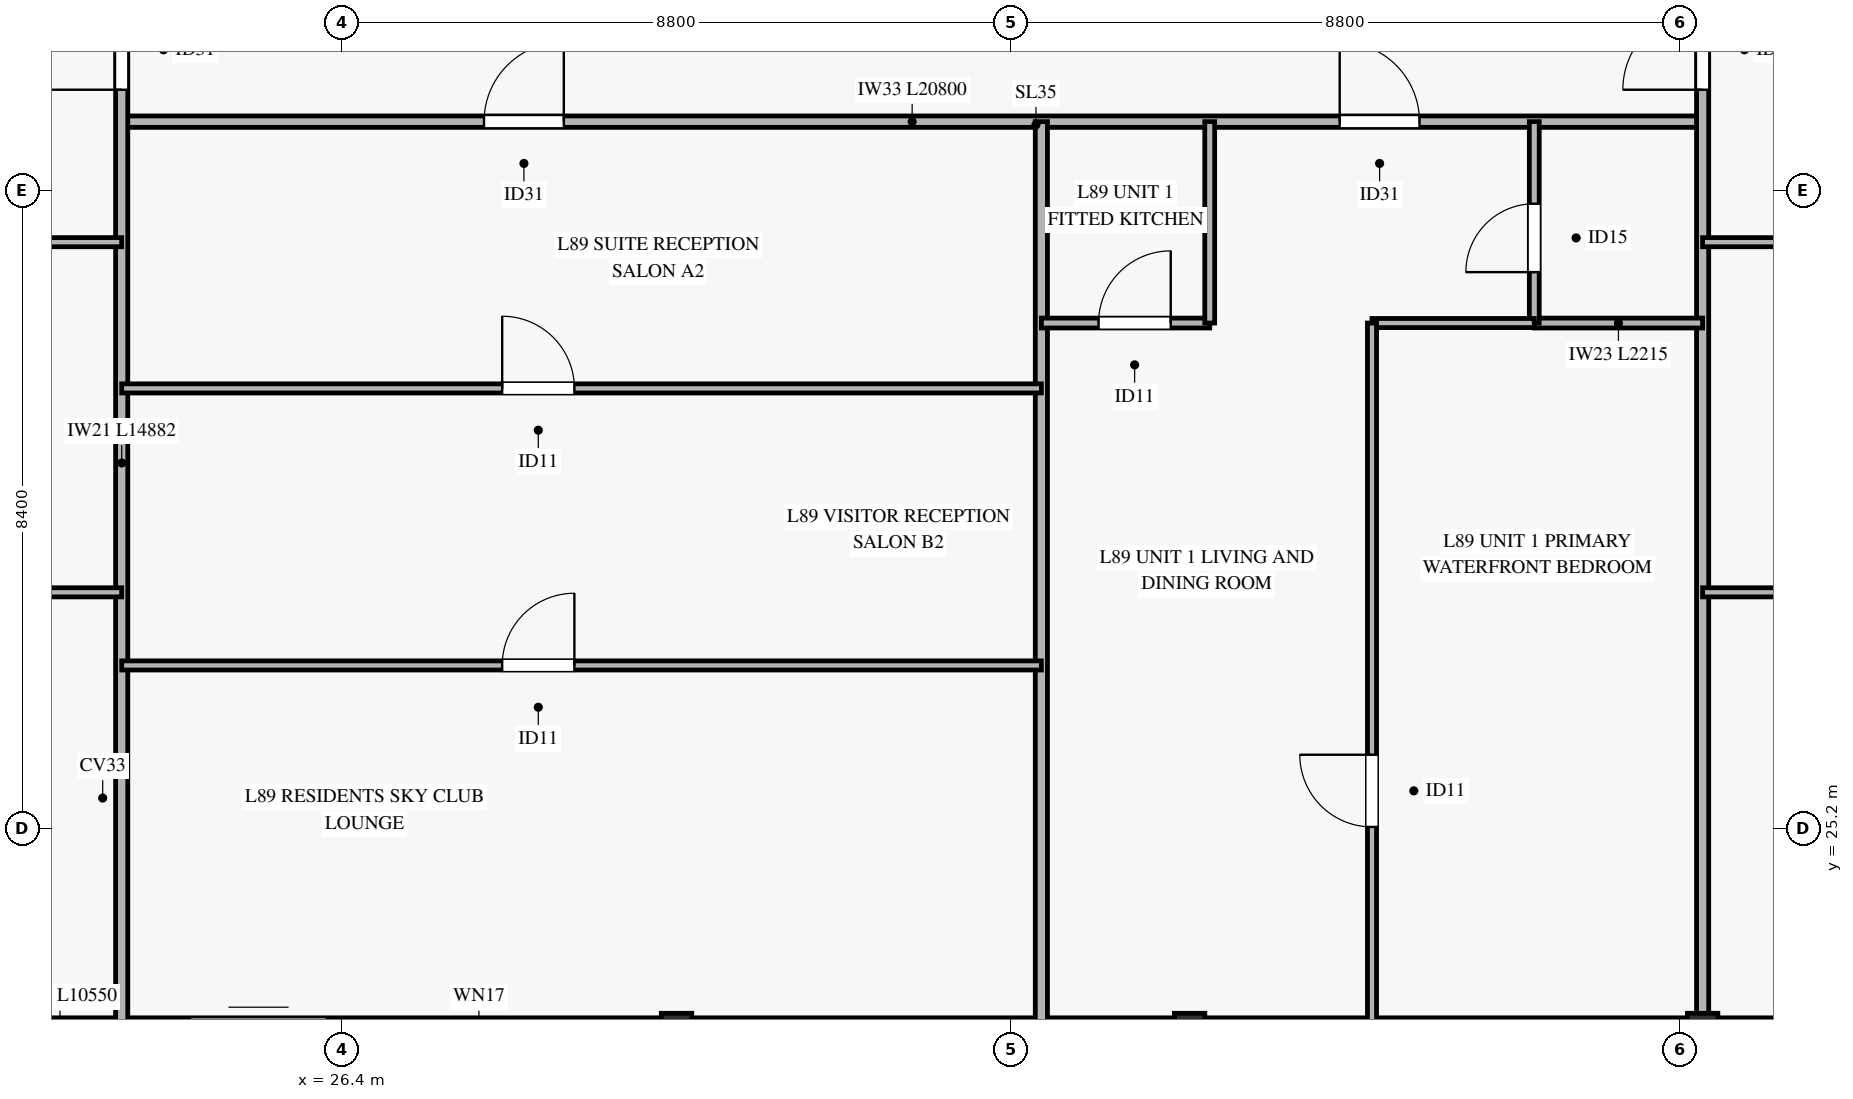
"""IFC4 building model, lengths in metres.
Left out: names, types, materials, properties, quantities, classifications, styles, units other than length and angle.
Written with IfcOpenShell. Run it as: python <this file> out.ifc"""

import sys

from ifc_helpers import new_model, si_unit, direction, frame, frame_2d, origin, origin_2d, place, context, subcontext, project, spatial, rectangle, hollow_rectangle, extrude, source, transform, mapped, element, fill, save


model = new_model("IFC4")
c1 = context("Model", 3, precision=1e-05, world=origin(), true_north=direction((0.0, 1.0)))
c2 = subcontext(c1, "Body", "Model", "MODEL_VIEW")
j1 = project(units=[si_unit("LENGTHUNIT", "METRE"), si_unit("PLANEANGLEUNIT", "RADIAN")], contexts=[c1])
p1 = place(None, origin())
s1 = spatial("IfcSite", under=j1, at=p1, CompositionType="ELEMENT")
p2 = place(p1, origin())
s2 = spatial("IfcBuilding", under=s1, at=p2, CompositionType="ELEMENT")
p3 = place(p2, frame((0.0, 0.0, 342.5)))
s3 = spatial("IfcBuildingStorey", under=s2, at=p3, CompositionType="ELEMENT", Elevation=342.5)
m1 = source(origin(), c2, "Body", "SweptSolid", [
    extrude(hollow_rectangle(XDim=0.4, YDim=0.4, WallThickness=0.02, at=origin_2d()), origin(), (0.0, 0.0, 1.0), 3.319),
])
for number, where, z_axis, x_axis in (
    (1, (30.8, 22.568, 0.0), (0.0, 0.281, 0.96), (-1.0, 0.0, 0.0)),
    (2, (37.55, 22.568, 0.0), (0.0, 0.281, 0.96), (-1.0, 0.0, 0.0)),
    (3, (44.3, 22.568, 0.0), (0.0, 0.281, 0.96), (-1.0, 0.0, 0.0)),
):
    element("IfcColumn", number, at=place(p3, frame(where, z_axis=z_axis, x_axis=x_axis)), inside=s3, PredefinedType="COLUMN", context=c2, shape_type="MappedRepresentation", body=[
        mapped(m1, transform((0.0, 0.0, 0.0), x_axis=(1.0, 0.0, 0.0), y_axis=(0.0, 1.0, 0.0), z_axis=(0.0, 0.0, 1.0), scale=1.0)),
    ])
p4 = place(p3, frame((20.05, 22.568, 0.0), z_axis=(0.0, 0.0, 1.0), x_axis=(1.0, 0.0, 0.0)))
e4 = element("IfcWall", 4, at=p4, inside=s3, PredefinedType="SOLIDWALL", context=c2, shape_type="SweptSolid", body=[
    extrude(rectangle(XDim=10.55, YDim=0.28, at=frame_2d((5.275, 0.0))), origin(), (0.0, 0.0, 1.0), 2.815),
])
p5 = place(p4, frame((4.35, 0.0, 0.0)))
e5 = element("IfcOpeningElement", 5, at=p5, cuts=e4, PredefinedType="OPENING", context=c2, shape_type="SweptSolid", body=[
    extrude(rectangle(XDim=1.8, YDim=2.25, at=frame_2d((0.9, 1.125))), frame((0.0, 0.15, 0.0), z_axis=(0.0, -1.0, 0.0), x_axis=(1.0, 0.0, 0.0)), (0.0, 0.0, 1.0), 0.3),
])
p6 = place(p4, frame((0.65, 0.0, 0.45)))
e6 = element("IfcOpeningElement", 6, at=p6, cuts=e4, PredefinedType="OPENING", context=c2, shape_type="SweptSolid", body=[
    extrude(rectangle(XDim=2.2, YDim=2.1, at=frame_2d((1.1, 1.05))), frame((0.0, 0.15, 0.0), z_axis=(0.0, -1.0, 0.0), x_axis=(1.0, 0.0, 0.0)), (0.0, 0.0, 1.0), 0.3),
])
p7 = place(p4, frame((7.35, 0.0, 0.45)))
e7 = element("IfcOpeningElement", 7, at=p7, cuts=e4, PredefinedType="OPENING", context=c2, shape_type="SweptSolid", body=[
    extrude(rectangle(XDim=1.6, YDim=2.0, at=frame_2d((0.8, 1.0))), frame((0.0, 0.15, 0.0), z_axis=(0.0, -1.0, 0.0), x_axis=(1.0, 0.0, 0.0)), (0.0, 0.0, 1.0), 0.3),
])
for number, where, z_axis, x_axis in (
    (8, (31.0, 22.568, 0.0), (0.0, 0.0, 1.0), (1.0, 0.0, 0.0)),
    (9, (37.75, 22.568, 0.0), (0.0, 0.0, 1.0), (1.0, 0.0, 0.0)),
):
    element("IfcWall", number, at=place(p3, frame(where, z_axis=z_axis, x_axis=x_axis)), inside=s3, PredefinedType="SOLIDWALL", context=c2, shape_type="SweptSolid", body=[
        extrude(rectangle(XDim=6.35, YDim=0.28, at=frame_2d((3.175, 0.0))), origin(), (0.0, 0.0, 1.0), 2.815),
    ])
p8 = place(p3, frame((44.5, 22.568, 0.0), z_axis=(0.0, 0.0, 1.0), x_axis=(1.0, 0.0, 0.0)))
e10 = element("IfcWall", 10, at=p8, inside=s3, PredefinedType="SOLIDWALL", context=c2, shape_type="SweptSolid", body=[
    extrude(rectangle(XDim=5.85, YDim=0.28, at=frame_2d((2.925, 0.0))), origin(), (0.0, 0.0, 1.0), 2.815),
])
p9 = place(p8, frame((2.0, 0.0, 0.0)))
e11 = element("IfcOpeningElement", 11, at=p9, cuts=e10, PredefinedType="OPENING", context=c2, shape_type="SweptSolid", body=[
    extrude(rectangle(XDim=1.8, YDim=2.25, at=frame_2d((0.9, 1.125))), frame((0.0, 0.15, 0.0), z_axis=(0.0, -1.0, 0.0), x_axis=(1.0, 0.0, 0.0)), (0.0, 0.0, 1.0), 0.3),
])
p10 = place(p3, frame((23.5, 34.5, 0.0), z_axis=(0.0, 0.0, 1.0), x_axis=(1.0, 0.0, 0.0)))
e12 = element("IfcWall", 12, at=p10, inside=s3, PredefinedType="PARTITIONING", context=c2, shape_type="SweptSolid", body=[
    extrude(rectangle(XDim=20.8, YDim=0.15, at=frame_2d((10.4, 0.0))), origin(), (0.0, 0.0, 1.0), 2.47),
])
p11 = place(p10, frame((4.767, 0.0, 0.0)))
e13 = element("IfcOpeningElement", 13, at=p11, cuts=e12, PredefinedType="OPENING", context=c2, shape_type="SweptSolid", body=[
    extrude(rectangle(XDim=1.05, YDim=2.15, at=frame_2d((0.525, 1.075))), frame((0.0, 0.085, 0.0), z_axis=(0.0, -1.0, 0.0), x_axis=(1.0, 0.0, 0.0)), (0.0, 0.0, 1.0), 0.17),
])
p12 = place(p10, frame((16.025, 0.0, 0.0)))
e14 = element("IfcOpeningElement", 14, at=p12, cuts=e12, PredefinedType="OPENING", context=c2, shape_type="SweptSolid", body=[
    extrude(rectangle(XDim=1.05, YDim=2.15, at=frame_2d((0.525, 1.075))), frame((0.0, 0.085, 0.0), z_axis=(0.0, -1.0, 0.0), x_axis=(1.0, 0.0, 0.0)), (0.0, 0.0, 1.0), 0.17),
])
p13 = place(p3, frame((23.5, 22.568, 0.0), z_axis=(0.0, 0.0, 1.0), x_axis=(0.0, 1.0, 0.0)))
e15 = element("IfcWall", 15, at=p13, inside=s3, PredefinedType="PARTITIONING", context=c2, shape_type="SweptSolid", body=[
    extrude(rectangle(XDim=14.882, YDim=0.16, at=frame_2d((7.441, 0.0))), origin(), (0.0, 0.0, 1.0), 2.77),
])
p14 = place(p13, frame((12.352, 0.0, 0.0)))
e16 = element("IfcOpeningElement", 16, at=p14, cuts=e15, PredefinedType="OPENING", context=c2, shape_type="SweptSolid", body=[
    extrude(rectangle(XDim=1.05, YDim=2.15, at=frame_2d((0.525, 1.075))), frame((0.0, 0.09, 0.0), z_axis=(0.0, -1.0, 0.0), x_axis=(1.0, 0.0, 0.0)), (0.0, 0.0, 1.0), 0.18),
])
p15 = place(p3, frame((35.6, 22.568, 0.0), z_axis=(0.0, 0.0, 1.0), x_axis=(0.0, 1.0, 0.0)))
e17 = element("IfcWall", 17, at=p15, inside=s3, PredefinedType="PARTITIONING", context=c2, shape_type="SweptSolid", body=[
    extrude(rectangle(XDim=11.932, YDim=0.16, at=frame_2d((5.966, 0.0))), origin(), (0.0, 0.0, 1.0), 2.77),
])
p16 = place(p3, frame((44.3, 22.568, 0.0), z_axis=(0.0, 0.0, 1.0), x_axis=(0.0, 1.0, 0.0)))
e18 = element("IfcWall", 18, at=p16, inside=s3, PredefinedType="PARTITIONING", context=c2, shape_type="SweptSolid", body=[
    extrude(rectangle(XDim=14.882, YDim=0.16, at=frame_2d((7.441, 0.0))), origin(), (0.0, 0.0, 1.0), 2.47),
])
p17 = place(p16, frame((12.352, 0.0, 0.0)))
e19 = element("IfcOpeningElement", 19, at=p17, cuts=e18, PredefinedType="OPENING", context=c2, shape_type="SweptSolid", body=[
    extrude(rectangle(XDim=1.05, YDim=2.15, at=frame_2d((0.525, 1.075))), frame((0.0, 0.09, 0.0), z_axis=(0.0, -1.0, 0.0), x_axis=(1.0, 0.0, 0.0)), (0.0, 0.0, 1.0), 0.18),
])
p18 = place(p3, frame((11.685, 28.307, 0.0), z_axis=(0.0, 0.0, 1.0), x_axis=(1.0, 0.0, 0.0)))
e20 = element("IfcWall", 20, at=p18, inside=s3, PredefinedType="PARTITIONING", context=c2, shape_type="SweptSolid", body=[
    extrude(rectangle(XDim=11.815, YDim=0.12, at=frame_2d((5.907, 0.0))), origin(), (0.0, 0.0, 1.0), 2.47),
])
p19 = place(p18, frame((5.261, 0.0, 0.0)))
e21 = element("IfcOpeningElement", 21, at=p19, cuts=e20, PredefinedType="OPENING", context=c2, shape_type="SweptSolid", body=[
    extrude(rectangle(XDim=0.95, YDim=2.1, at=frame_2d((0.475, 1.05))), frame((0.0, 0.07, 0.0), z_axis=(0.0, -1.0, 0.0), x_axis=(1.0, 0.0, 0.0)), (0.0, 0.0, 1.0), 0.14),
])
p20 = place(p3, frame((11.685, 32.914, 0.0), z_axis=(0.0, 0.0, 1.0), x_axis=(1.0, 0.0, 0.0)))
e22 = element("IfcWall", 22, at=p20, inside=s3, PredefinedType="PARTITIONING", context=c2, shape_type="SweptSolid", body=[
    extrude(rectangle(XDim=11.815, YDim=0.12, at=frame_2d((5.907, 0.0))), origin(), (0.0, 0.0, 1.0), 2.47),
])
p21 = place(p20, frame((5.261, 0.0, 0.0)))
e23 = element("IfcOpeningElement", 23, at=p21, cuts=e22, PredefinedType="OPENING", context=c2, shape_type="SweptSolid", body=[
    extrude(rectangle(XDim=0.95, YDim=2.1, at=frame_2d((0.475, 1.05))), frame((0.0, 0.07, 0.0), z_axis=(0.0, -1.0, 0.0), x_axis=(1.0, 0.0, 0.0)), (0.0, 0.0, 1.0), 0.14),
])
p22 = place(p3, frame((23.5, 27.345, 0.0), z_axis=(0.0, 0.0, 1.0), x_axis=(1.0, 0.0, 0.0)))
e24 = element("IfcWall", 24, at=p22, inside=s3, PredefinedType="PARTITIONING", context=c2, shape_type="SweptSolid", body=[
    extrude(rectangle(XDim=12.1, YDim=0.12, at=frame_2d((6.05, 0.0))), origin(), (0.0, 0.0, 1.0), 2.47),
])
p23 = place(p22, frame((5.006, 0.0, 0.0)))
e25 = element("IfcOpeningElement", 25, at=p23, cuts=e24, PredefinedType="OPENING", context=c2, shape_type="SweptSolid", body=[
    extrude(rectangle(XDim=0.95, YDim=2.1, at=frame_2d((0.475, 1.05))), frame((0.0, 0.07, 0.0), z_axis=(0.0, -1.0, 0.0), x_axis=(1.0, 0.0, 0.0)), (0.0, 0.0, 1.0), 0.14),
])
p24 = place(p3, frame((23.5, 30.99, 0.0), z_axis=(0.0, 0.0, 1.0), x_axis=(1.0, 0.0, 0.0)))
e26 = element("IfcWall", 26, at=p24, inside=s3, PredefinedType="PARTITIONING", context=c2, shape_type="SweptSolid", body=[
    extrude(rectangle(XDim=12.1, YDim=0.12, at=frame_2d((6.05, 0.0))), origin(), (0.0, 0.0, 1.0), 2.47),
])
p25 = place(p24, frame((5.006, 0.0, 0.0)))
e27 = element("IfcOpeningElement", 27, at=p25, cuts=e26, PredefinedType="OPENING", context=c2, shape_type="SweptSolid", body=[
    extrude(rectangle(XDim=0.95, YDim=2.1, at=frame_2d((0.475, 1.05))), frame((0.0, 0.07, 0.0), z_axis=(0.0, -1.0, 0.0), x_axis=(1.0, 0.0, 0.0)), (0.0, 0.0, 1.0), 0.14),
])
p26 = place(p3, frame((35.6, 31.85, 0.0), z_axis=(0.0, 0.0, 1.0), x_axis=(1.0, 0.0, 0.0)))
e28 = element("IfcWall", 28, at=p26, inside=s3, PredefinedType="PARTITIONING", context=c2, shape_type="SweptSolid", body=[
    extrude(rectangle(XDim=2.215, YDim=0.13, at=frame_2d((1.107, 0.0))), origin(), (0.0, 0.0, 1.0), 2.47),
])
p27 = place(p26, frame((0.752, 0.0, 0.0)))
e29 = element("IfcOpeningElement", 29, at=p27, cuts=e28, PredefinedType="OPENING", context=c2, shape_type="SweptSolid", body=[
    extrude(rectangle(XDim=0.95, YDim=2.1, at=frame_2d((0.475, 1.05))), frame((0.0, 0.075, 0.0), z_axis=(0.0, -1.0, 0.0), x_axis=(1.0, 0.0, 0.0)), (0.0, 0.0, 1.0), 0.15),
])
p28 = place(p3, frame((37.815, 31.85, 0.0), z_axis=(0.0, 0.0, 1.0), x_axis=(0.0, 1.0, 0.0)))
e30 = element("IfcWall", 30, at=p28, inside=s3, PredefinedType="PARTITIONING", context=c2, shape_type="SweptSolid", body=[
    extrude(rectangle(XDim=2.65, YDim=0.13, at=frame_2d((1.325, 0.0))), origin(), (0.0, 0.0, 1.0), 2.77),
])
p29 = place(p3, frame((42.085, 31.85, 0.0), z_axis=(0.0, 0.0, 1.0), x_axis=(1.0, 0.0, 0.0)))
e31 = element("IfcWall", 31, at=p29, inside=s3, PredefinedType="PARTITIONING", context=c2, shape_type="SweptSolid", body=[
    extrude(rectangle(XDim=2.215, YDim=0.13, at=frame_2d((1.107, 0.0))), origin(), (0.0, 0.0, 1.0), 2.47),
])
p30 = place(p3, frame((42.085, 31.85, 0.0), z_axis=(0.0, 0.0, 1.0), x_axis=(0.0, 1.0, 0.0)))
e32 = element("IfcWall", 32, at=p30, inside=s3, PredefinedType="PARTITIONING", context=c2, shape_type="SweptSolid", body=[
    extrude(rectangle(XDim=2.65, YDim=0.13, at=frame_2d((1.325, 0.0))), origin(), (0.0, 0.0, 1.0), 2.77),
])
p31 = place(p30, frame((0.67, 0.0, 0.0)))
e33 = element("IfcOpeningElement", 33, at=p31, cuts=e32, PredefinedType="OPENING", context=c2, shape_type="SweptSolid", body=[
    extrude(rectangle(XDim=0.9, YDim=2.1, at=frame_2d((0.45, 1.05))), frame((0.0, 0.075, 0.0), z_axis=(0.0, -1.0, 0.0), x_axis=(1.0, 0.0, 0.0)), (0.0, 0.0, 1.0), 0.15),
])
p32 = place(p3, frame((39.95, 31.85, 0.0), z_axis=(0.0, 0.0, 1.0), x_axis=(1.0, 0.0, 0.0)))
e34 = element("IfcWall", 34, at=p32, inside=s3, PredefinedType="PARTITIONING", context=c2, shape_type="SweptSolid", body=[
    extrude(rectangle(XDim=2.135, YDim=0.12, at=frame_2d((1.067, 0.0))), origin(), (0.0, 0.0, 1.0), 3.185),
])
p33 = place(p3, frame((39.95, 22.568, 0.0), z_axis=(0.0, 0.0, 1.0), x_axis=(0.0, 1.0, 0.0)))
e35 = element("IfcWall", 35, at=p33, inside=s3, PredefinedType="PARTITIONING", context=c2, shape_type="SweptSolid", body=[
    extrude(rectangle(XDim=9.282, YDim=0.12, at=frame_2d((4.641, 0.0))), origin(), (0.0, 0.0, 1.0), 2.77),
])
p34 = place(p33, frame((2.652, 0.0, 0.0)))
e36 = element("IfcOpeningElement", 36, at=p34, cuts=e35, PredefinedType="OPENING", context=c2, shape_type="SweptSolid", body=[
    extrude(rectangle(XDim=0.95, YDim=2.1, at=frame_2d((0.475, 1.05))), frame((0.0, 0.07, 0.0), z_axis=(0.0, -1.0, 0.0), x_axis=(1.0, 0.0, 0.0)), (0.0, 0.0, 1.0), 0.14),
])
p35 = place(p3, frame((44.3, 28.307, 0.0), z_axis=(0.0, 0.0, 1.0), x_axis=(1.0, 0.0, 0.0)))
e37 = element("IfcWall", 37, at=p35, inside=s3, PredefinedType="PARTITIONING", context=c2, shape_type="SweptSolid", body=[
    extrude(rectangle(XDim=14.415, YDim=0.12, at=frame_2d((7.208, 0.0))), origin(), (0.0, 0.0, 1.0), 2.47),
])
p36 = place(p35, frame((5.686, 0.0, 0.0)))
e38 = element("IfcOpeningElement", 38, at=p36, cuts=e37, PredefinedType="OPENING", context=c2, shape_type="SweptSolid", body=[
    extrude(rectangle(XDim=0.95, YDim=2.1, at=frame_2d((0.475, 1.05))), frame((0.0, 0.07, 0.0), z_axis=(0.0, -1.0, 0.0), x_axis=(1.0, 0.0, 0.0)), (0.0, 0.0, 1.0), 0.14),
])
p37 = place(p3, frame((44.3, 32.914, 0.0), z_axis=(0.0, 0.0, 1.0), x_axis=(1.0, 0.0, 0.0)))
e39 = element("IfcWall", 39, at=p37, inside=s3, PredefinedType="PARTITIONING", context=c2, shape_type="SweptSolid", body=[
    extrude(rectangle(XDim=14.415, YDim=0.12, at=frame_2d((7.208, 0.0))), origin(), (0.0, 0.0, 1.0), 2.47),
])
p38 = place(p37, frame((5.686, 0.0, 0.0)))
e40 = element("IfcOpeningElement", 40, at=p38, cuts=e39, PredefinedType="OPENING", context=c2, shape_type="SweptSolid", body=[
    extrude(rectangle(XDim=0.95, YDim=2.1, at=frame_2d((0.475, 1.05))), frame((0.0, 0.07, 0.0), z_axis=(0.0, -1.0, 0.0), x_axis=(1.0, 0.0, 0.0)), (0.0, 0.0, 1.0), 0.14),
])
m2 = source(origin(), c2, "Body", "SweptSolid", [
    extrude(rectangle(XDim=1.05, YDim=2.15, at=frame_2d((0.525, 1.075))), frame((0.0, 0.025, 0.0), z_axis=(0.0, -1.0, 0.0), x_axis=(1.0, 0.0, 0.0)), (0.0, 0.0, 1.0), 0.05),
])
p39 = place(p14, origin())
e41 = element("IfcDoor", 41, at=p39, inside=s3, OperationType="SINGLE_SWING_LEFT", PredefinedType="DOOR", context=c2, shape_type="MappedRepresentation", body=[
    mapped(m2, transform((0.0, 0.0, 0.0), x_axis=(1.0, 0.0, 0.0), y_axis=(0.0, 1.0, 0.0), z_axis=(0.0, 0.0, 1.0), scale=1.0)),
])
fill(e16, e41)
p40 = place(p11, origin())
e42 = element("IfcDoor", 42, at=p40, inside=s3, OperationType="SINGLE_SWING_RIGHT", PredefinedType="DOOR", context=c2, shape_type="MappedRepresentation", body=[
    mapped(m2, transform((0.0, 0.0, 0.0), x_axis=(1.0, 0.0, 0.0), y_axis=(0.0, 1.0, 0.0), z_axis=(0.0, 0.0, 1.0), scale=1.0)),
])
fill(e13, e42)
m3 = source(origin(), c2, "Body", "SweptSolid", [
    extrude(rectangle(XDim=0.95, YDim=2.1, at=frame_2d((0.475, 1.05))), frame((0.0, 0.025, 0.0), z_axis=(0.0, -1.0, 0.0), x_axis=(1.0, 0.0, 0.0)), (0.0, 0.0, 1.0), 0.05),
])
p41 = place(p25, origin())
e43 = element("IfcDoor", 43, at=p41, inside=s3, OperationType="SINGLE_SWING_LEFT", PredefinedType="DOOR", context=c2, shape_type="MappedRepresentation", body=[
    mapped(m3, transform((0.0, 0.0, 0.0), x_axis=(1.0, 0.0, 0.0), y_axis=(0.0, 1.0, 0.0), z_axis=(0.0, 0.0, 1.0), scale=1.0)),
])
fill(e27, e43)
p42 = place(p23, origin())
e44 = element("IfcDoor", 44, at=p42, inside=s3, OperationType="SINGLE_SWING_RIGHT", PredefinedType="DOOR", context=c2, shape_type="MappedRepresentation", body=[
    mapped(m3, transform((0.0, 0.0, 0.0), x_axis=(1.0, 0.0, 0.0), y_axis=(0.0, 1.0, 0.0), z_axis=(0.0, 0.0, 1.0), scale=1.0)),
])
fill(e25, e44)
p43 = place(p12, origin())
e45 = element("IfcDoor", 45, at=p43, inside=s3, OperationType="SINGLE_SWING_LEFT", PredefinedType="DOOR", context=c2, shape_type="MappedRepresentation", body=[
    mapped(m2, transform((0.0, 0.0, 0.0), x_axis=(1.0, 0.0, 0.0), y_axis=(0.0, 1.0, 0.0), z_axis=(0.0, 0.0, 1.0), scale=1.0)),
])
fill(e14, e45)
p44 = place(p27, origin())
e46 = element("IfcDoor", 46, at=p44, inside=s3, OperationType="SINGLE_SWING_RIGHT", PredefinedType="DOOR", context=c2, shape_type="MappedRepresentation", body=[
    mapped(m3, transform((0.0, 0.0, 0.0), x_axis=(1.0, 0.0, 0.0), y_axis=(0.0, 1.0, 0.0), z_axis=(0.0, 0.0, 1.0), scale=1.0)),
])
fill(e29, e46)
m4 = source(origin(), c2, "Body", "SweptSolid", [
    extrude(rectangle(XDim=0.9, YDim=2.1, at=frame_2d((0.45, 1.05))), frame((0.0, 0.025, 0.0), z_axis=(0.0, -1.0, 0.0), x_axis=(1.0, 0.0, 0.0)), (0.0, 0.0, 1.0), 0.05),
])
p45 = place(p31, origin())
e47 = element("IfcDoor", 47, at=p45, inside=s3, OperationType="SINGLE_SWING_LEFT", PredefinedType="DOOR", context=c2, shape_type="MappedRepresentation", body=[
    mapped(m4, transform((0.0, 0.0, 0.0), x_axis=(1.0, 0.0, 0.0), y_axis=(0.0, 1.0, 0.0), z_axis=(0.0, 0.0, 1.0), scale=1.0)),
])
fill(e33, e47)
p46 = place(p34, origin())
e48 = element("IfcDoor", 48, at=p46, inside=s3, OperationType="SINGLE_SWING_RIGHT", PredefinedType="DOOR", context=c2, shape_type="MappedRepresentation", body=[
    mapped(m3, transform((0.0, 0.0, 0.0), x_axis=(1.0, 0.0, 0.0), y_axis=(0.0, 1.0, 0.0), z_axis=(0.0, 0.0, 1.0), scale=1.0)),
])
fill(e36, e48)
p47 = place(p17, origin())
e49 = element("IfcDoor", 49, at=p47, inside=s3, OperationType="SINGLE_SWING_LEFT", PredefinedType="DOOR", context=c2, shape_type="MappedRepresentation", body=[
    mapped(m2, transform((0.0, 0.0, 0.0), x_axis=(1.0, 0.0, 0.0), y_axis=(0.0, 1.0, 0.0), z_axis=(0.0, 0.0, 1.0), scale=1.0)),
])
fill(e19, e49)
save(model, sys.argv[1])
